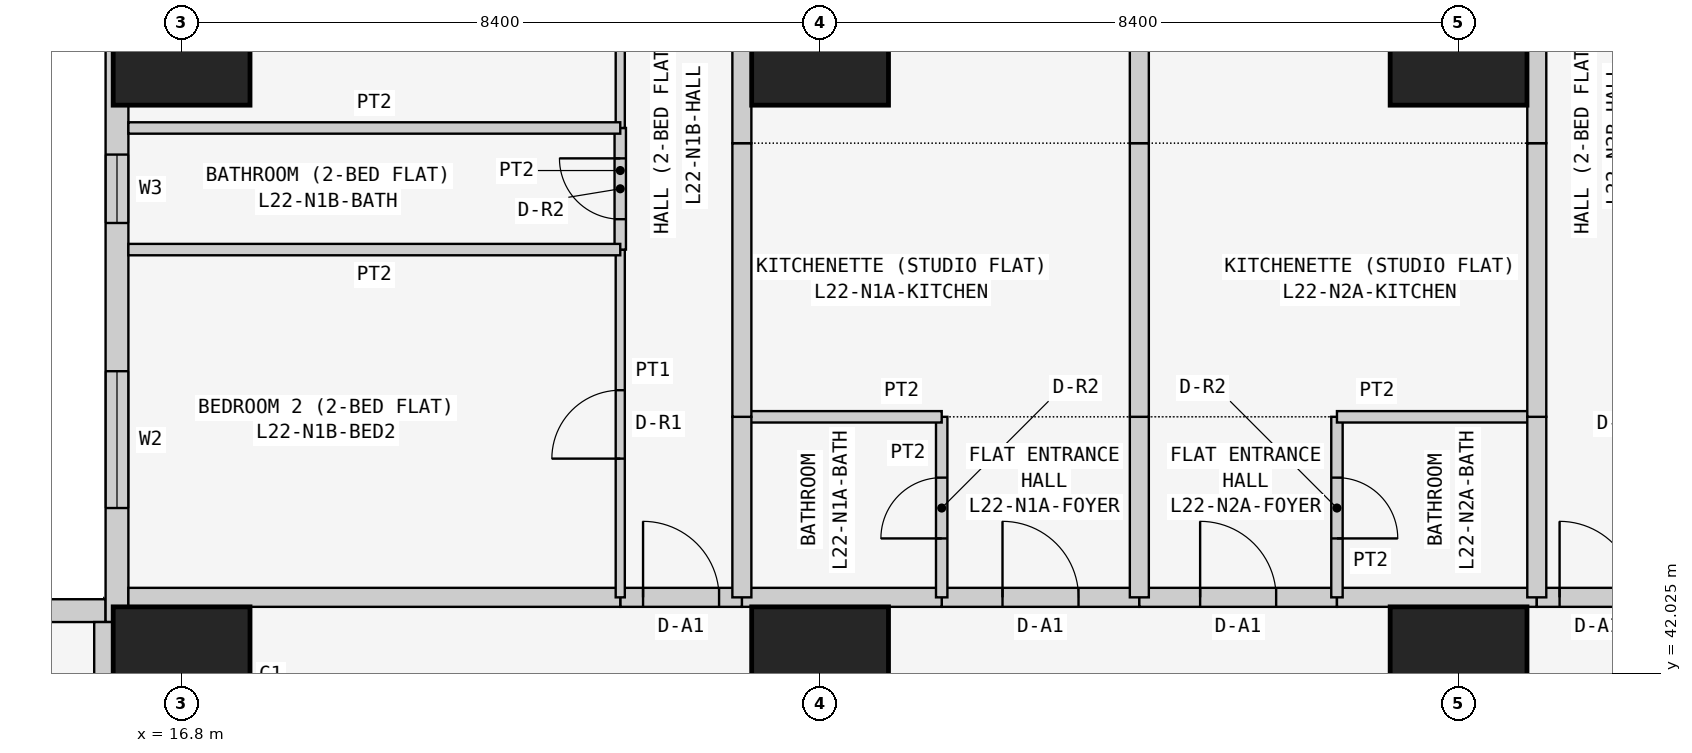
"""IFC4 building model, lengths in metres.
Left out: names, types, materials, properties, quantities, classifications, styles, units other than length and angle.
Written with IfcOpenShell. Run it as: python <this file> out.ifc"""

import sys

from ifc_helpers import new_model, si_unit, direction, frame, frame_2d, origin, origin_2d, place, context, subcontext, project, spatial, rectangle, extrude, element, fill, save


model = new_model("IFC4")
c1 = context("Model", 3, precision=1e-05, world=origin(), true_north=direction((0.0, 1.0)))
c2 = subcontext(c1, "Body", "Model", "MODEL_VIEW")
j1 = project(units=[si_unit("LENGTHUNIT", "METRE"), si_unit("PLANEANGLEUNIT", "RADIAN")], contexts=[c1])
p1 = place(None, origin())
s1 = spatial("IfcSite", under=j1, at=p1, CompositionType="ELEMENT")
p2 = place(p1, origin())
s2 = spatial("IfcBuilding", under=s1, at=p2, CompositionType="ELEMENT")
p3 = place(p2, frame((0.0, 0.0, 88.5)))
s3 = spatial("IfcBuildingStorey", under=s2, at=p3, CompositionType="ELEMENT", Elevation=88.5)
for number, where, z_axis, x_axis in (
    (1, (16.8, 42.0, 0.0), (0.0, 0.0, 1.0), (1.0, 0.0, 0.0)),
    (2, (16.8, 50.4, 0.0), (0.0, 0.0, 1.0), (1.0, 0.0, 0.0)),
    (3, (25.2, 42.0, 0.0), (0.0, 0.0, 1.0), (1.0, 0.0, 0.0)),
    (4, (25.2, 50.4, 0.0), (0.0, 0.0, 1.0), (1.0, 0.0, 0.0)),
    (5, (33.6, 42.0, 0.0), (0.0, 0.0, 1.0), (1.0, 0.0, 0.0)),
    (6, (33.6, 50.4, 0.0), (0.0, 0.0, 1.0), (1.0, 0.0, 0.0)),
):
    element("IfcColumn", number, at=place(p3, frame(where, z_axis=z_axis, x_axis=x_axis)), inside=s3, PredefinedType="COLUMN", context=c2, shape_type="SweptSolid", body=[
        extrude(rectangle(XDim=1.8, YDim=1.8, at=origin_2d()), origin(), (0.0, 0.0, 1.0), 3.6),
    ])
p4 = place(p3, frame((15.8, 42.85, 0.0), z_axis=(0.0, 0.0, 1.0), x_axis=(-1.0, 0.0, 0.0)))
e7 = element("IfcWall", 7, at=p4, inside=s3, PredefinedType="SOLIDWALL", context=c2, shape_type="SweptSolid", body=[
    extrude(rectangle(XDim=15.4, YDim=0.3, at=frame_2d((7.7, 0.0))), origin(), (0.0, 0.0, 1.0), 3.45),
])
p5 = place(p4, frame((1.2, 0.0, 0.9)))
e8 = element("IfcOpeningElement", 8, at=p5, cuts=e7, PredefinedType="OPENING", context=c2, shape_type="SweptSolid", body=[
    extrude(rectangle(XDim=1.8, YDim=1.5, at=frame_2d((0.9, 0.75))), frame((0.0, 0.16, 0.0), z_axis=(0.0, -1.0, 0.0), x_axis=(1.0, 0.0, 0.0)), (0.0, 0.0, 1.0), 0.32),
])
p6 = place(p4, frame((4.95, 0.0, 1.5)))
e9 = element("IfcOpeningElement", 9, at=p6, cuts=e7, PredefinedType="OPENING", context=c2, shape_type="SweptSolid", body=[
    extrude(rectangle(XDim=0.9, YDim=0.7, at=frame_2d((0.45, 0.35))), frame((0.0, 0.16, 0.0), z_axis=(0.0, -1.0, 0.0), x_axis=(1.0, 0.0, 0.0)), (0.0, 0.0, 1.0), 0.32),
])
p7 = place(p4, frame((8.5, 0.0, 0.9)))
e10 = element("IfcOpeningElement", 10, at=p7, cuts=e7, PredefinedType="OPENING", context=c2, shape_type="SweptSolid", body=[
    extrude(rectangle(XDim=1.8, YDim=1.5, at=frame_2d((0.9, 0.75))), frame((0.0, 0.16, 0.0), z_axis=(0.0, -1.0, 0.0), x_axis=(1.0, 0.0, 0.0)), (0.0, 0.0, 1.0), 0.32),
])
p8 = place(p4, frame((12.5, 0.0, 0.0)))
e11 = element("IfcOpeningElement", 11, at=p8, cuts=e7, PredefinedType="OPENING", context=c2, shape_type="SweptSolid", body=[
    extrude(rectangle(XDim=0.9, YDim=2.4, at=frame_2d((0.45, 1.2))), frame((0.0, 0.16, 0.0), z_axis=(0.0, -1.0, 0.0), x_axis=(1.0, 0.0, 0.0)), (0.0, 0.0, 1.0), 0.32),
])
p9 = place(p4, frame((13.5, 0.0, 0.9)))
e12 = element("IfcOpeningElement", 12, at=p9, cuts=e7, PredefinedType="OPENING", context=c2, shape_type="SweptSolid", body=[
    extrude(rectangle(XDim=1.2, YDim=1.5, at=frame_2d((0.6, 0.75))), frame((0.0, 0.16, 0.0), z_axis=(0.0, -1.0, 0.0), x_axis=(1.0, 0.0, 0.0)), (0.0, 0.0, 1.0), 0.32),
])
p10 = place(p3, frame((15.95, 58.4, 0.0), z_axis=(0.0, 0.0, 1.0), x_axis=(0.0, -1.0, 0.0)))
e13 = element("IfcWall", 13, at=p10, inside=s3, PredefinedType="SOLIDWALL", context=c2, shape_type="SweptSolid", body=[
    extrude(rectangle(XDim=15.7, YDim=0.3, at=frame_2d((7.85, 0.0))), origin(), (0.0, 0.0, 1.0), 3.45),
])
p11 = place(p10, frame((12.4, 0.0, 0.9)))
e14 = element("IfcOpeningElement", 14, at=p11, cuts=e13, PredefinedType="OPENING", context=c2, shape_type="SweptSolid", body=[
    extrude(rectangle(XDim=1.8, YDim=1.5, at=frame_2d((0.9, 0.75))), frame((0.0, 0.16, 0.0), z_axis=(0.0, -1.0, 0.0), x_axis=(1.0, 0.0, 0.0)), (0.0, 0.0, 1.0), 0.32),
])
p12 = place(p10, frame((9.55, 0.0, 1.5)))
e15 = element("IfcOpeningElement", 15, at=p12, cuts=e13, PredefinedType="OPENING", context=c2, shape_type="SweptSolid", body=[
    extrude(rectangle(XDim=0.9, YDim=0.7, at=frame_2d((0.45, 0.35))), frame((0.0, 0.16, 0.0), z_axis=(0.0, -1.0, 0.0), x_axis=(1.0, 0.0, 0.0)), (0.0, 0.0, 1.0), 0.32),
])
p13 = place(p10, frame((5.1, 0.0, 0.9)))
e16 = element("IfcOpeningElement", 16, at=p13, cuts=e13, PredefinedType="OPENING", context=c2, shape_type="SweptSolid", body=[
    extrude(rectangle(XDim=1.8, YDim=1.5, at=frame_2d((0.9, 0.75))), frame((0.0, 0.16, 0.0), z_axis=(0.0, -1.0, 0.0), x_axis=(1.0, 0.0, 0.0)), (0.0, 0.0, 1.0), 0.32),
])
p14 = place(p10, frame((2.0, 0.0, 0.0)))
e17 = element("IfcOpeningElement", 17, at=p14, cuts=e13, PredefinedType="OPENING", context=c2, shape_type="SweptSolid", body=[
    extrude(rectangle(XDim=0.9, YDim=2.4, at=frame_2d((0.45, 1.2))), frame((0.0, 0.16, 0.0), z_axis=(0.0, -1.0, 0.0), x_axis=(1.0, 0.0, 0.0)), (0.0, 0.0, 1.0), 0.32),
])
p15 = place(p10, frame((0.7, 0.0, 0.9)))
e18 = element("IfcOpeningElement", 18, at=p15, cuts=e13, PredefinedType="OPENING", context=c2, shape_type="SweptSolid", body=[
    extrude(rectangle(XDim=1.2, YDim=1.5, at=frame_2d((0.6, 0.75))), frame((0.0, 0.16, 0.0), z_axis=(0.0, -1.0, 0.0), x_axis=(1.0, 0.0, 0.0)), (0.0, 0.0, 1.0), 0.32),
])
p16 = place(p3, frame((26.8, 43.025, 0.0), z_axis=(0.0, 0.0, 1.0), x_axis=(1.0, 0.0, 0.0)))
e19 = element("IfcWall", 19, at=p16, inside=s3, PredefinedType="PARTITIONING", context=c2, shape_type="SweptSolid", body=[
    extrude(rectangle(XDim=2.6, YDim=0.25, at=frame_2d((1.3, 0.0))), origin(), (0.0, 0.0, 1.0), 3.45),
])
p17 = place(p16, frame((0.8, 0.0, 0.0)))
e20 = element("IfcOpeningElement", 20, at=p17, cuts=e19, PredefinedType="OPENING", context=c2, shape_type="SweptSolid", body=[
    extrude(rectangle(XDim=1.0, YDim=2.1, at=frame_2d((0.5, 1.05))), frame((0.0, 0.135, 0.0), z_axis=(0.0, -1.0, 0.0), x_axis=(1.0, 0.0, 0.0)), (0.0, 0.0, 1.0), 0.27),
])
p18 = place(p3, frame((24.171, 43.025, 0.0), z_axis=(0.0, 0.0, 1.0), x_axis=(1.0, 0.0, 0.0)))
e21 = element("IfcWall", 21, at=p18, inside=s3, PredefinedType="PARTITIONING", context=c2, shape_type="SweptSolid", body=[
    extrude(rectangle(XDim=2.629, YDim=0.25, at=frame_2d((1.314, 0.0))), origin(), (0.0, 0.0, 1.0), 3.45),
])
p19 = place(p3, frame((22.571, 43.025, 0.0), z_axis=(0.0, 0.0, 1.0), x_axis=(1.0, 0.0, 0.0)))
e22 = element("IfcWall", 22, at=p19, inside=s3, PredefinedType="PARTITIONING", context=c2, shape_type="SweptSolid", body=[
    extrude(rectangle(XDim=1.6, YDim=0.25, at=frame_2d((0.8, 0.0))), origin(), (0.0, 0.0, 1.0), 3.45),
])
p20 = place(p19, frame((0.3, 0.0, 0.0)))
e23 = element("IfcOpeningElement", 23, at=p20, cuts=e22, PredefinedType="OPENING", context=c2, shape_type="SweptSolid", body=[
    extrude(rectangle(XDim=1.0, YDim=2.1, at=frame_2d((0.5, 1.05))), frame((0.0, 0.135, 0.0), z_axis=(0.0, -1.0, 0.0), x_axis=(1.0, 0.0, 0.0)), (0.0, 0.0, 1.0), 0.27),
])
p21 = place(p3, frame((16.1, 43.025, 0.0), z_axis=(0.0, 0.0, 1.0), x_axis=(1.0, 0.0, 0.0)))
e24 = element("IfcWall", 24, at=p21, inside=s3, PredefinedType="PARTITIONING", context=c2, shape_type="SweptSolid", body=[
    extrude(rectangle(XDim=6.471, YDim=0.25, at=frame_2d((3.235, 0.0))), origin(), (0.0, 0.0, 1.0), 3.45),
])
p22 = place(p3, frame((29.4, 43.025, 0.0), z_axis=(0.0, 0.0, 1.0), x_axis=(1.0, 0.0, 0.0)))
e25 = element("IfcWall", 25, at=p22, inside=s3, PredefinedType="PARTITIONING", context=c2, shape_type="SweptSolid", body=[
    extrude(rectangle(XDim=2.6, YDim=0.25, at=frame_2d((1.3, 0.0))), origin(), (0.0, 0.0, 1.0), 3.45),
])
p23 = place(p22, frame((0.8, 0.0, 0.0)))
e26 = element("IfcOpeningElement", 26, at=p23, cuts=e25, PredefinedType="OPENING", context=c2, shape_type="SweptSolid", body=[
    extrude(rectangle(XDim=1.0, YDim=2.1, at=frame_2d((0.5, 1.05))), frame((0.0, 0.135, 0.0), z_axis=(0.0, -1.0, 0.0), x_axis=(1.0, 0.0, 0.0)), (0.0, 0.0, 1.0), 0.27),
])
p24 = place(p3, frame((32.0, 43.025, 0.0), z_axis=(0.0, 0.0, 1.0), x_axis=(1.0, 0.0, 0.0)))
e27 = element("IfcWall", 27, at=p24, inside=s3, PredefinedType="PARTITIONING", context=c2, shape_type="SweptSolid", body=[
    extrude(rectangle(XDim=2.629, YDim=0.25, at=frame_2d((1.314, 0.0))), origin(), (0.0, 0.0, 1.0), 3.45),
])
p25 = place(p3, frame((34.629, 43.025, 0.0), z_axis=(0.0, 0.0, 1.0), x_axis=(1.0, 0.0, 0.0)))
e28 = element("IfcWall", 28, at=p25, inside=s3, PredefinedType="PARTITIONING", context=c2, shape_type="SweptSolid", body=[
    extrude(rectangle(XDim=1.6, YDim=0.25, at=frame_2d((0.8, 0.0))), origin(), (0.0, 0.0, 1.0), 3.45),
])
p26 = place(p25, frame((0.3, 0.0, 0.0)))
e29 = element("IfcOpeningElement", 29, at=p26, cuts=e28, PredefinedType="OPENING", context=c2, shape_type="SweptSolid", body=[
    extrude(rectangle(XDim=1.0, YDim=2.1, at=frame_2d((0.5, 1.05))), frame((0.0, 0.135, 0.0), z_axis=(0.0, -1.0, 0.0), x_axis=(1.0, 0.0, 0.0)), (0.0, 0.0, 1.0), 0.27),
])
p27 = place(p3, frame((15.775, 36.229, 0.0), z_axis=(0.0, 0.0, 1.0), x_axis=(0.0, 1.0, 0.0)))
e30 = element("IfcWall", 30, at=p27, inside=s3, PredefinedType="PARTITIONING", context=c2, shape_type="SweptSolid", body=[
    extrude(rectangle(XDim=6.471, YDim=0.25, at=frame_2d((3.235, 0.0))), origin(), (0.0, 0.0, 1.0), 3.45),
])
p28 = place(p3, frame((26.8, 45.4, 0.0), z_axis=(0.0, 0.0, 1.0), x_axis=(0.0, -1.0, 0.0)))
e31 = element("IfcWall", 31, at=p28, inside=s3, PredefinedType="PARTITIONING", context=c2, shape_type="SweptSolid", body=[
    extrude(rectangle(XDim=2.375, YDim=0.15, at=frame_2d((1.188, 0.0))), origin(), (0.0, 0.0, 1.0), 3.45),
])
p29 = place(p28, frame((0.8, 0.0, 0.0)))
e32 = element("IfcOpeningElement", 32, at=p29, cuts=e31, PredefinedType="OPENING", context=c2, shape_type="SweptSolid", body=[
    extrude(rectangle(XDim=0.8, YDim=2.1, at=frame_2d((0.4, 1.05))), frame((0.0, 0.085, 0.0), z_axis=(0.0, -1.0, 0.0), x_axis=(1.0, 0.0, 0.0)), (0.0, 0.0, 1.0), 0.17),
])
p30 = place(p3, frame((29.4, 43.025, 0.0), z_axis=(0.0, 0.0, 1.0), x_axis=(0.0, 1.0, 0.0)))
e33 = element("IfcWall", 33, at=p30, inside=s3, PredefinedType="PARTITIONING", context=c2, shape_type="SweptSolid", body=[
    extrude(rectangle(XDim=2.375, YDim=0.25, at=frame_2d((1.188, 0.0))), origin(), (0.0, 0.0, 1.0), 2.848),
])
p31 = place(p3, frame((26.8, 45.4, 0.0), z_axis=(0.0, 0.0, 1.0), x_axis=(-1.0, 0.0, 0.0)))
e34 = element("IfcWall", 34, at=p31, inside=s3, PredefinedType="PARTITIONING", context=c2, shape_type="SweptSolid", body=[
    extrude(rectangle(XDim=2.629, YDim=0.15, at=frame_2d((1.314, 0.0))), origin(), (0.0, 0.0, 1.0), 3.45),
])
p32 = place(p3, frame((24.171, 45.4, 0.0), z_axis=(0.0, 0.0, 1.0), x_axis=(0.0, -1.0, 0.0)))
e35 = element("IfcWall", 35, at=p32, inside=s3, PredefinedType="PARTITIONING", context=c2, shape_type="SweptSolid", body=[
    extrude(rectangle(XDim=2.375, YDim=0.25, at=frame_2d((1.188, 0.0))), origin(), (0.0, 0.0, 1.0), 3.45),
])
p33 = place(p3, frame((24.171, 49.0, 0.0), z_axis=(0.0, 0.0, 1.0), x_axis=(0.0, -1.0, 0.0)))
e36 = element("IfcWall", 36, at=p33, inside=s3, PredefinedType="PARTITIONING", context=c2, shape_type="SweptSolid", body=[
    extrude(rectangle(XDim=3.6, YDim=0.25, at=frame_2d((1.8, 0.0))), origin(), (0.0, 0.0, 1.0), 3.45),
])
p34 = place(p3, frame((29.4, 45.4, 0.0), z_axis=(0.0, 0.0, 1.0), x_axis=(0.0, 1.0, 0.0)))
e37 = element("IfcWall", 37, at=p34, inside=s3, PredefinedType="PARTITIONING", context=c2, shape_type="SweptSolid", body=[
    extrude(rectangle(XDim=3.6, YDim=0.25, at=frame_2d((1.8, 0.0))), origin(), (0.0, 0.0, 1.0), 2.848),
])
p35 = place(p3, frame((24.171, 55.3, 0.0), z_axis=(0.0, 0.0, 1.0), x_axis=(0.0, -1.0, 0.0)))
e38 = element("IfcWall", 38, at=p35, inside=s3, PredefinedType="PARTITIONING", context=c2, shape_type="SweptSolid", body=[
    extrude(rectangle(XDim=6.3, YDim=0.25, at=frame_2d((3.15, 0.0))), origin(), (0.0, 0.0, 1.0), 3.45),
])
p36 = place(p3, frame((29.4, 49.0, 0.0), z_axis=(0.0, 0.0, 1.0), x_axis=(0.0, 1.0, 0.0)))
e39 = element("IfcWall", 39, at=p36, inside=s3, PredefinedType="PARTITIONING", context=c2, shape_type="SweptSolid", body=[
    extrude(rectangle(XDim=10.45, YDim=0.25, at=frame_2d((5.225, 0.0))), origin(), (0.0, 0.0, 1.0), 2.848),
])
p37 = place(p3, frame((22.571, 47.6, 0.0), z_axis=(0.0, 0.0, 1.0), x_axis=(0.0, -1.0, 0.0)))
e40 = element("IfcWall", 40, at=p37, inside=s3, PredefinedType="PARTITIONING", context=c2, shape_type="SweptSolid", body=[
    extrude(rectangle(XDim=4.575, YDim=0.12, at=frame_2d((2.288, 0.0))), origin(), (0.0, 0.0, 1.0), 3.45),
])
p38 = place(p37, frame((1.85, 0.0, 0.0)))
e41 = element("IfcOpeningElement", 41, at=p38, cuts=e40, PredefinedType="OPENING", context=c2, shape_type="SweptSolid", body=[
    extrude(rectangle(XDim=0.9, YDim=2.1, at=frame_2d((0.45, 1.05))), frame((0.0, 0.07, 0.0), z_axis=(0.0, -1.0, 0.0), x_axis=(1.0, 0.0, 0.0)), (0.0, 0.0, 1.0), 0.14),
])
p39 = place(p3, frame((22.571, 49.2, 0.0), z_axis=(0.0, 0.0, 1.0), x_axis=(0.0, -1.0, 0.0)))
e42 = element("IfcWall", 42, at=p39, inside=s3, PredefinedType="PARTITIONING", context=c2, shape_type="SweptSolid", body=[
    extrude(rectangle(XDim=1.6, YDim=0.15, at=frame_2d((0.8, 0.0))), origin(), (0.0, 0.0, 1.0), 3.45),
])
p40 = place(p39, frame((0.4, 0.0, 0.0)))
e43 = element("IfcOpeningElement", 43, at=p40, cuts=e42, PredefinedType="OPENING", context=c2, shape_type="SweptSolid", body=[
    extrude(rectangle(XDim=0.8, YDim=2.1, at=frame_2d((0.4, 1.05))), frame((0.0, 0.085, 0.0), z_axis=(0.0, -1.0, 0.0), x_axis=(1.0, 0.0, 0.0)), (0.0, 0.0, 1.0), 0.17),
])
p41 = place(p3, frame((22.571, 54.1, 0.0), z_axis=(0.0, 0.0, 1.0), x_axis=(0.0, -1.0, 0.0)))
e44 = element("IfcWall", 44, at=p41, inside=s3, PredefinedType="PARTITIONING", context=c2, shape_type="SweptSolid", body=[
    extrude(rectangle(XDim=4.9, YDim=0.12, at=frame_2d((2.45, 0.0))), origin(), (0.0, 0.0, 1.0), 3.45),
])
p42 = place(p41, frame((1.65, 0.0, 0.0)))
e45 = element("IfcOpeningElement", 45, at=p42, cuts=e44, PredefinedType="OPENING", context=c2, shape_type="SweptSolid", body=[
    extrude(rectangle(XDim=0.9, YDim=2.1, at=frame_2d((0.45, 1.05))), frame((0.0, 0.07, 0.0), z_axis=(0.0, -1.0, 0.0), x_axis=(1.0, 0.0, 0.0)), (0.0, 0.0, 1.0), 0.14),
])
for number, where, z_axis, x_axis in (
    (46, (22.571, 47.6, 0.0), (0.0, 0.0, 1.0), (-1.0, 0.0, 0.0)),
    (47, (22.571, 49.2, 0.0), (0.0, 0.0, 1.0), (-1.0, 0.0, 0.0)),
):
    element("IfcWall", number, at=place(p3, frame(where, z_axis=z_axis, x_axis=x_axis)), inside=s3, PredefinedType="PARTITIONING", context=c2, shape_type="SweptSolid", body=[
        extrude(rectangle(XDim=6.471, YDim=0.15, at=frame_2d((3.235, 0.0))), origin(), (0.0, 0.0, 1.0), 3.45),
    ])
p43 = place(p3, frame((32.0, 45.4, 0.0), z_axis=(0.0, 0.0, 1.0), x_axis=(0.0, -1.0, 0.0)))
e48 = element("IfcWall", 48, at=p43, inside=s3, PredefinedType="PARTITIONING", context=c2, shape_type="SweptSolid", body=[
    extrude(rectangle(XDim=2.375, YDim=0.15, at=frame_2d((1.188, 0.0))), origin(), (0.0, 0.0, 1.0), 3.45),
])
p44 = place(p43, frame((0.8, 0.0, 0.0)))
e49 = element("IfcOpeningElement", 49, at=p44, cuts=e48, PredefinedType="OPENING", context=c2, shape_type="SweptSolid", body=[
    extrude(rectangle(XDim=0.8, YDim=2.1, at=frame_2d((0.4, 1.05))), frame((0.0, 0.085, 0.0), z_axis=(0.0, -1.0, 0.0), x_axis=(1.0, 0.0, 0.0)), (0.0, 0.0, 1.0), 0.17),
])
p45 = place(p3, frame((32.0, 45.4, 0.0), z_axis=(0.0, 0.0, 1.0), x_axis=(1.0, 0.0, 0.0)))
e50 = element("IfcWall", 50, at=p45, inside=s3, PredefinedType="PARTITIONING", context=c2, shape_type="SweptSolid", body=[
    extrude(rectangle(XDim=2.629, YDim=0.15, at=frame_2d((1.314, 0.0))), origin(), (0.0, 0.0, 1.0), 3.45),
])
p46 = place(p3, frame((34.629, 45.4, 0.0), z_axis=(0.0, 0.0, 1.0), x_axis=(0.0, -1.0, 0.0)))
e51 = element("IfcWall", 51, at=p46, inside=s3, PredefinedType="PARTITIONING", context=c2, shape_type="SweptSolid", body=[
    extrude(rectangle(XDim=2.375, YDim=0.25, at=frame_2d((1.188, 0.0))), origin(), (0.0, 0.0, 1.0), 3.45),
])
p47 = place(p3, frame((34.629, 49.0, 0.0), z_axis=(0.0, 0.0, 1.0), x_axis=(0.0, -1.0, 0.0)))
e52 = element("IfcWall", 52, at=p47, inside=s3, PredefinedType="PARTITIONING", context=c2, shape_type="SweptSolid", body=[
    extrude(rectangle(XDim=3.6, YDim=0.25, at=frame_2d((1.8, 0.0))), origin(), (0.0, 0.0, 1.0), 3.45),
])
p48 = place(p3, frame((34.629, 55.3, 0.0), z_axis=(0.0, 0.0, 1.0), x_axis=(0.0, -1.0, 0.0)))
e53 = element("IfcWall", 53, at=p48, inside=s3, PredefinedType="PARTITIONING", context=c2, shape_type="SweptSolid", body=[
    extrude(rectangle(XDim=6.3, YDim=0.25, at=frame_2d((3.15, 0.0))), origin(), (0.0, 0.0, 1.0), 3.45),
])
p49 = place(p11, origin())
e54 = element("IfcWindow", 54, at=p49, inside=s3, PartitioningType="SINGLE_PANEL", PredefinedType="WINDOW", context=c2, shape_type="SweptSolid", body=[
    extrude(rectangle(XDim=1.8, YDim=1.5, at=frame_2d((0.9, 0.75))), frame((0.0, 0.03, 0.0), z_axis=(0.0, -1.0, 0.0), x_axis=(1.0, 0.0, 0.0)), (0.0, 0.0, 1.0), 0.06),
])
fill(e14, e54)
p50 = place(p12, origin())
e55 = element("IfcWindow", 55, at=p50, inside=s3, PartitioningType="SINGLE_PANEL", PredefinedType="WINDOW", context=c2, shape_type="SweptSolid", body=[
    extrude(rectangle(XDim=0.9, YDim=0.7, at=frame_2d((0.45, 0.35))), frame((0.0, 0.03, 0.0), z_axis=(0.0, -1.0, 0.0), x_axis=(1.0, 0.0, 0.0)), (0.0, 0.0, 1.0), 0.06),
])
fill(e15, e55)
p51 = place(p17, origin())
e56 = element("IfcDoor", 56, at=p51, inside=s3, OperationType="SINGLE_SWING_LEFT", PredefinedType="DOOR", context=c2, shape_type="SweptSolid", body=[
    extrude(rectangle(XDim=1.0, YDim=2.1, at=frame_2d((0.5, 1.05))), frame((0.0, 0.025, 0.0), z_axis=(0.0, -1.0, 0.0), x_axis=(1.0, 0.0, 0.0)), (0.0, 0.0, 1.0), 0.05),
])
fill(e20, e56)
p52 = place(p29, frame((0.8, 0.0, 0.0), z_axis=(0.0, 0.0, 1.0), x_axis=(-1.0, 0.0, 0.0)))
e57 = element("IfcDoor", 57, at=p52, inside=s3, OperationType="SINGLE_SWING_LEFT", PredefinedType="DOOR", context=c2, shape_type="SweptSolid", body=[
    extrude(rectangle(XDim=0.8, YDim=2.1, at=frame_2d((0.4, 1.05))), frame((0.0, 0.025, 0.0), z_axis=(0.0, -1.0, 0.0), x_axis=(1.0, 0.0, 0.0)), (0.0, 0.0, 1.0), 0.05),
])
fill(e32, e57)
p53 = place(p20, origin())
e58 = element("IfcDoor", 58, at=p53, inside=s3, OperationType="SINGLE_SWING_LEFT", PredefinedType="DOOR", context=c2, shape_type="SweptSolid", body=[
    extrude(rectangle(XDim=1.0, YDim=2.1, at=frame_2d((0.5, 1.05))), frame((0.0, 0.025, 0.0), z_axis=(0.0, -1.0, 0.0), x_axis=(1.0, 0.0, 0.0)), (0.0, 0.0, 1.0), 0.05),
])
fill(e23, e58)
p54 = place(p38, frame((0.9, 0.0, 0.0), z_axis=(0.0, 0.0, 1.0), x_axis=(-1.0, 0.0, 0.0)))
e59 = element("IfcDoor", 59, at=p54, inside=s3, OperationType="SINGLE_SWING_LEFT", PredefinedType="DOOR", context=c2, shape_type="SweptSolid", body=[
    extrude(rectangle(XDim=0.9, YDim=2.1, at=frame_2d((0.45, 1.05))), frame((0.0, 0.025, 0.0), z_axis=(0.0, -1.0, 0.0), x_axis=(1.0, 0.0, 0.0)), (0.0, 0.0, 1.0), 0.05),
])
fill(e41, e59)
p55 = place(p40, frame((0.8, 0.0, 0.0), z_axis=(0.0, 0.0, 1.0), x_axis=(-1.0, 0.0, 0.0)))
e60 = element("IfcDoor", 60, at=p55, inside=s3, OperationType="SINGLE_SWING_RIGHT", PredefinedType="DOOR", context=c2, shape_type="SweptSolid", body=[
    extrude(rectangle(XDim=0.8, YDim=2.1, at=frame_2d((0.4, 1.05))), frame((0.0, 0.025, 0.0), z_axis=(0.0, -1.0, 0.0), x_axis=(1.0, 0.0, 0.0)), (0.0, 0.0, 1.0), 0.05),
])
fill(e43, e60)
p56 = place(p23, origin())
e61 = element("IfcDoor", 61, at=p56, inside=s3, OperationType="SINGLE_SWING_LEFT", PredefinedType="DOOR", context=c2, shape_type="SweptSolid", body=[
    extrude(rectangle(XDim=1.0, YDim=2.1, at=frame_2d((0.5, 1.05))), frame((0.0, 0.025, 0.0), z_axis=(0.0, -1.0, 0.0), x_axis=(1.0, 0.0, 0.0)), (0.0, 0.0, 1.0), 0.05),
])
fill(e26, e61)
p57 = place(p44, origin())
e62 = element("IfcDoor", 62, at=p57, inside=s3, OperationType="SINGLE_SWING_RIGHT", PredefinedType="DOOR", context=c2, shape_type="SweptSolid", body=[
    extrude(rectangle(XDim=0.8, YDim=2.1, at=frame_2d((0.4, 1.05))), frame((0.0, 0.025, 0.0), z_axis=(0.0, -1.0, 0.0), x_axis=(1.0, 0.0, 0.0)), (0.0, 0.0, 1.0), 0.05),
])
fill(e49, e62)
p58 = place(p26, origin())
e63 = element("IfcDoor", 63, at=p58, inside=s3, OperationType="SINGLE_SWING_LEFT", PredefinedType="DOOR", context=c2, shape_type="SweptSolid", body=[
    extrude(rectangle(XDim=1.0, YDim=2.1, at=frame_2d((0.5, 1.05))), frame((0.0, 0.025, 0.0), z_axis=(0.0, -1.0, 0.0), x_axis=(1.0, 0.0, 0.0)), (0.0, 0.0, 1.0), 0.05),
])
fill(e29, e63)
save(model, sys.argv[1])
